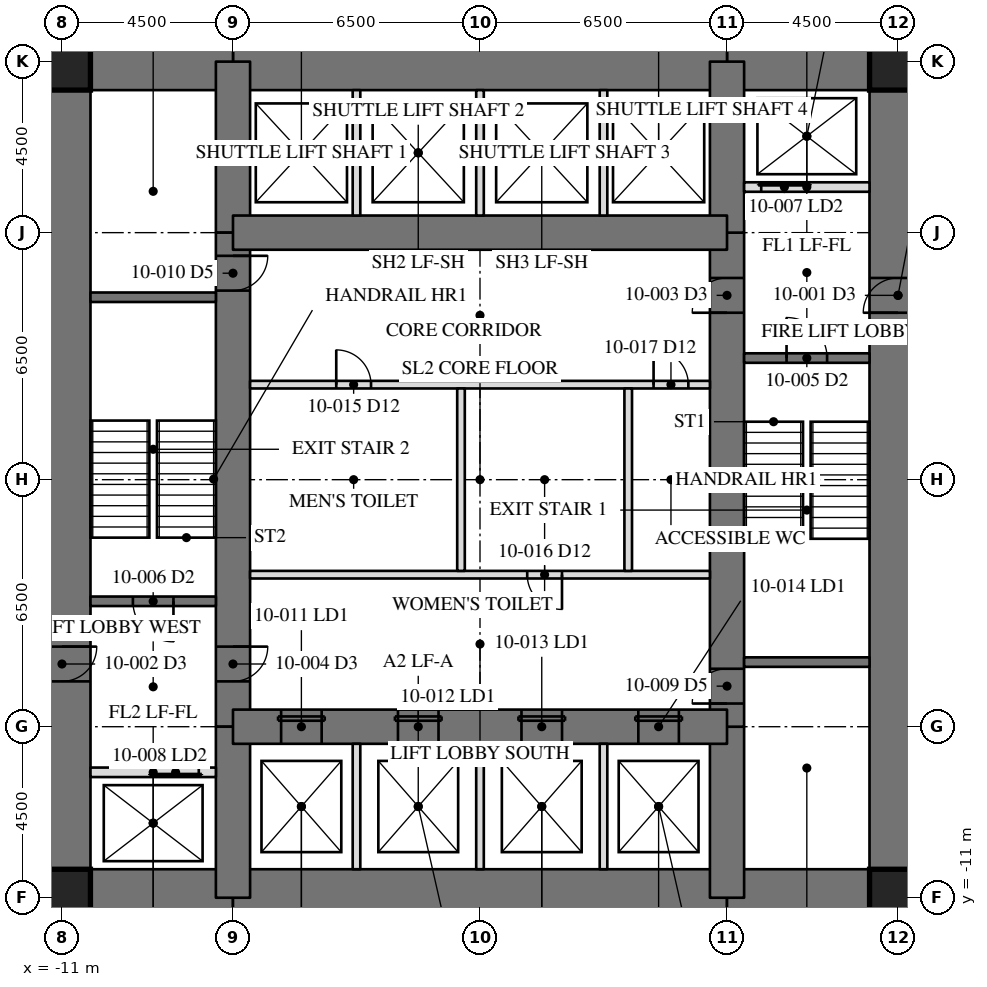
"""IFC4 building model, lengths in metres.
Left out: names, types, materials, properties, quantities, classifications, styles, units other than length and angle.
Written with IfcOpenShell. Run it as: python <this file> out.ifc"""

import sys

from ifc_helpers import new_model, si_unit, direction, frame, frame_2d, origin, origin_2d, place, context, subcontext, project, spatial, rectangle, hollow_rectangle, extrude, element, fill, save


model = new_model("IFC4")
c1 = context("Model", 3, precision=1e-05, world=origin(), true_north=direction((0.0, 1.0)))
c2 = subcontext(c1, "Body", "Model", "MODEL_VIEW")
j1 = project(units=[si_unit("LENGTHUNIT", "METRE"), si_unit("PLANEANGLEUNIT", "RADIAN")], contexts=[c1])
p1 = place(None, origin())
s1 = spatial("IfcSite", under=j1, at=p1, CompositionType="ELEMENT")
p2 = place(p1, origin())
s2 = spatial("IfcBuilding", under=s1, at=p2, CompositionType="ELEMENT")
p3 = place(p2, frame((0.0, 0.0, 44.7)))
s3 = spatial("IfcBuildingStorey", under=s2, at=p3, CompositionType="ELEMENT", Elevation=44.7)
p4 = place(p3, frame((11.0, -11.0, 0.0), z_axis=(0.0, 0.0, 1.0), x_axis=(0.0, 1.0, 0.0)))
e1 = element("IfcWall", 1, at=p4, inside=s3, PredefinedType="SHEAR", context=c2, shape_type="SweptSolid", body=[
    extrude(rectangle(XDim=22.0, YDim=1.5, at=frame_2d((11.0, 0.0))), origin(), (0.0, 0.0, 1.0), 4.1),
])
p5 = place(p4, frame((15.393, 0.0, 0.0)))
e2 = element("IfcOpeningElement", 2, at=p5, cuts=e1, PredefinedType="OPENING", context=c2, shape_type="SweptSolid", body=[
    extrude(rectangle(XDim=0.915, YDim=2.134, at=frame_2d((0.458, 1.067))), frame((0.0, 0.76, 0.0), z_axis=(0.0, -1.0, 0.0), x_axis=(1.0, 0.0, 0.0)), (0.0, 0.0, 1.0), 1.52),
])
p6 = place(p3, frame((-11.0, 11.0, 0.0), z_axis=(0.0, 0.0, 1.0), x_axis=(0.0, -1.0, 0.0)))
e3 = element("IfcWall", 3, at=p6, inside=s3, PredefinedType="SHEAR", context=c2, shape_type="SweptSolid", body=[
    extrude(rectangle(XDim=22.0, YDim=1.5, at=frame_2d((11.0, 0.0))), origin(), (0.0, 0.0, 1.0), 4.1),
])
p7 = place(p6, frame((15.393, 0.0, 0.0)))
e4 = element("IfcOpeningElement", 4, at=p7, cuts=e3, PredefinedType="OPENING", context=c2, shape_type="SweptSolid", body=[
    extrude(rectangle(XDim=0.915, YDim=2.134, at=frame_2d((0.458, 1.067))), frame((0.0, 0.76, 0.0), z_axis=(0.0, -1.0, 0.0), x_axis=(1.0, 0.0, 0.0)), (0.0, 0.0, 1.0), 1.52),
])
p8 = place(p3, frame((11.0, 11.0, 0.0), z_axis=(0.0, 0.0, 1.0), x_axis=(-1.0, 0.0, 0.0)))
e5 = element("IfcWall", 5, at=p8, inside=s3, PredefinedType="SHEAR", context=c2, shape_type="SweptSolid", body=[
    extrude(rectangle(XDim=4.5, YDim=1.5, at=frame_2d((2.25, 0.0))), origin(), (0.0, 0.0, 1.0), 4.1),
])
p9 = place(p3, frame((6.5, 11.0, 0.0), z_axis=(0.0, 0.0, 1.0), x_axis=(-1.0, 0.0, 0.0)))
e6 = element("IfcWall", 6, at=p9, inside=s3, PredefinedType="SHEAR", context=c2, shape_type="SweptSolid", body=[
    extrude(rectangle(XDim=13.0, YDim=1.5, at=frame_2d((6.5, 0.0))), origin(), (0.0, 0.0, 1.0), 4.1),
])
for number, where, z_axis, x_axis in (
    (7, (-6.5, 11.0, 0.0), (0.0, 0.0, 1.0), (-1.0, 0.0, 0.0)),
    (8, (-11.0, -11.0, 0.0), (0.0, 0.0, 1.0), (1.0, 0.0, 0.0)),
):
    element("IfcWall", number, at=place(p3, frame(where, z_axis=z_axis, x_axis=x_axis)), inside=s3, PredefinedType="SHEAR", context=c2, shape_type="SweptSolid", body=[
        extrude(rectangle(XDim=4.5, YDim=1.5, at=frame_2d((2.25, 0.0))), origin(), (0.0, 0.0, 1.0), 4.1),
    ])
p10 = place(p3, frame((-6.5, -11.0, 0.0), z_axis=(0.0, 0.0, 1.0), x_axis=(1.0, 0.0, 0.0)))
e9 = element("IfcWall", 9, at=p10, inside=s3, PredefinedType="SHEAR", context=c2, shape_type="SweptSolid", body=[
    extrude(rectangle(XDim=13.0, YDim=1.5, at=frame_2d((6.5, 0.0))), origin(), (0.0, 0.0, 1.0), 4.1),
])
p11 = place(p3, frame((6.5, -11.0, 0.0), z_axis=(0.0, 0.0, 1.0), x_axis=(1.0, 0.0, 0.0)))
e10 = element("IfcWall", 10, at=p11, inside=s3, PredefinedType="SHEAR", context=c2, shape_type="SweptSolid", body=[
    extrude(rectangle(XDim=4.5, YDim=1.5, at=frame_2d((2.25, 0.0))), origin(), (0.0, 0.0, 1.0), 4.1),
])
p12 = place(p3, frame((6.5, -11.0, 0.0), z_axis=(0.0, 0.0, 1.0), x_axis=(0.0, 1.0, 0.0)))
e11 = element("IfcWall", 11, at=p12, inside=s3, PredefinedType="SHEAR", context=c2, shape_type="SweptSolid", body=[
    extrude(rectangle(XDim=4.5, YDim=0.9, at=frame_2d((2.25, 0.0))), origin(), (0.0, 0.0, 1.0), 4.1),
])
p13 = place(p3, frame((6.5, -6.5, 0.0), z_axis=(0.0, 0.0, 1.0), x_axis=(0.0, 1.0, 0.0)))
e12 = element("IfcWall", 12, at=p13, inside=s3, PredefinedType="SHEAR", context=c2, shape_type="SweptSolid", body=[
    extrude(rectangle(XDim=13.0, YDim=0.9, at=frame_2d((6.5, 0.0))), origin(), (0.0, 0.0, 1.0), 4.1),
])
p14 = place(p13, frame((10.893, 0.0, 0.0)))
e13 = element("IfcOpeningElement", 13, at=p14, cuts=e12, PredefinedType="OPENING", context=c2, shape_type="SweptSolid", body=[
    extrude(rectangle(XDim=0.915, YDim=2.134, at=frame_2d((0.458, 1.067))), frame((0.0, 0.46, 0.0), z_axis=(0.0, -1.0, 0.0), x_axis=(1.0, 0.0, 0.0)), (0.0, 0.0, 1.0), 0.92),
])
p15 = place(p13, frame((0.61, 0.0, 0.0)))
e14 = element("IfcOpeningElement", 14, at=p15, cuts=e12, PredefinedType="OPENING", context=c2, shape_type="SweptSolid", body=[
    extrude(rectangle(XDim=0.915, YDim=2.134, at=frame_2d((0.458, 1.067))), frame((0.0, 0.46, 0.0), z_axis=(0.0, -1.0, 0.0), x_axis=(1.0, 0.0, 0.0)), (0.0, 0.0, 1.0), 0.92),
])
for number, where, z_axis, x_axis in (
    (15, (6.5, 6.5, 0.0), (0.0, 0.0, 1.0), (0.0, 1.0, 0.0)),
    (16, (-6.5, 11.0, 0.0), (0.0, 0.0, 1.0), (0.0, -1.0, 0.0)),
):
    element("IfcWall", number, at=place(p3, frame(where, z_axis=z_axis, x_axis=x_axis)), inside=s3, PredefinedType="SHEAR", context=c2, shape_type="SweptSolid", body=[
        extrude(rectangle(XDim=4.5, YDim=0.9, at=frame_2d((2.25, 0.0))), origin(), (0.0, 0.0, 1.0), 4.1),
    ])
p16 = place(p3, frame((-6.5, 6.5, 0.0), z_axis=(0.0, 0.0, 1.0), x_axis=(0.0, -1.0, 0.0)))
e17 = element("IfcWall", 17, at=p16, inside=s3, PredefinedType="SHEAR", context=c2, shape_type="SweptSolid", body=[
    extrude(rectangle(XDim=13.0, YDim=0.9, at=frame_2d((6.5, 0.0))), origin(), (0.0, 0.0, 1.0), 4.1),
])
p17 = place(p16, frame((10.893, 0.0, 0.0)))
e18 = element("IfcOpeningElement", 18, at=p17, cuts=e17, PredefinedType="OPENING", context=c2, shape_type="SweptSolid", body=[
    extrude(rectangle(XDim=0.915, YDim=2.134, at=frame_2d((0.458, 1.067))), frame((0.0, 0.46, 0.0), z_axis=(0.0, -1.0, 0.0), x_axis=(1.0, 0.0, 0.0)), (0.0, 0.0, 1.0), 0.92),
])
p18 = place(p16, frame((0.61, 0.0, 0.0)))
e19 = element("IfcOpeningElement", 19, at=p18, cuts=e17, PredefinedType="OPENING", context=c2, shape_type="SweptSolid", body=[
    extrude(rectangle(XDim=0.915, YDim=2.134, at=frame_2d((0.458, 1.067))), frame((0.0, 0.46, 0.0), z_axis=(0.0, -1.0, 0.0), x_axis=(1.0, 0.0, 0.0)), (0.0, 0.0, 1.0), 0.92),
])
p19 = place(p3, frame((-6.5, -6.5, 0.0), z_axis=(0.0, 0.0, 1.0), x_axis=(0.0, -1.0, 0.0)))
e20 = element("IfcWall", 20, at=p19, inside=s3, PredefinedType="SHEAR", context=c2, shape_type="SweptSolid", body=[
    extrude(rectangle(XDim=4.5, YDim=0.9, at=frame_2d((2.25, 0.0))), origin(), (0.0, 0.0, 1.0), 4.1),
])
p20 = place(p3, frame((6.5, 6.5, 0.0), z_axis=(0.0, 0.0, 1.0), x_axis=(-1.0, 0.0, 0.0)))
e21 = element("IfcWall", 21, at=p20, inside=s3, PredefinedType="SHEAR", context=c2, shape_type="SweptSolid", body=[
    extrude(rectangle(XDim=13.0, YDim=0.9, at=frame_2d((6.5, 0.0))), origin(), (0.0, 0.0, 1.0), 4.1),
])
p21 = place(p3, frame((-6.5, -6.5, 0.0), z_axis=(0.0, 0.0, 1.0), x_axis=(1.0, 0.0, 0.0)))
e22 = element("IfcWall", 22, at=p21, inside=s3, PredefinedType="SHEAR", context=c2, shape_type="SweptSolid", body=[
    extrude(rectangle(XDim=13.0, YDim=0.9, at=frame_2d((6.5, 0.0))), origin(), (0.0, 0.0, 1.0), 4.1),
])
p22 = place(p21, frame((1.267, 0.0, 0.0)))
e23 = element("IfcOpeningElement", 23, at=p22, cuts=e22, PredefinedType="OPENING", context=c2, shape_type="SweptSolid", body=[
    extrude(rectangle(XDim=1.067, YDim=2.134, at=frame_2d((0.533, 1.067))), frame((0.0, 0.46, 0.0), z_axis=(0.0, -1.0, 0.0), x_axis=(1.0, 0.0, 0.0)), (0.0, 0.0, 1.0), 0.92),
])
p23 = place(p21, frame((4.342, 0.0, 0.0)))
e24 = element("IfcOpeningElement", 24, at=p23, cuts=e22, PredefinedType="OPENING", context=c2, shape_type="SweptSolid", body=[
    extrude(rectangle(XDim=1.067, YDim=2.134, at=frame_2d((0.533, 1.067))), frame((0.0, 0.46, 0.0), z_axis=(0.0, -1.0, 0.0), x_axis=(1.0, 0.0, 0.0)), (0.0, 0.0, 1.0), 0.92),
])
p24 = place(p21, frame((7.592, 0.0, 0.0)))
e25 = element("IfcOpeningElement", 25, at=p24, cuts=e22, PredefinedType="OPENING", context=c2, shape_type="SweptSolid", body=[
    extrude(rectangle(XDim=1.067, YDim=2.134, at=frame_2d((0.533, 1.067))), frame((0.0, 0.46, 0.0), z_axis=(0.0, -1.0, 0.0), x_axis=(1.0, 0.0, 0.0)), (0.0, 0.0, 1.0), 0.92),
])
p25 = place(p21, frame((10.667, 0.0, 0.0)))
e26 = element("IfcOpeningElement", 26, at=p25, cuts=e22, PredefinedType="OPENING", context=c2, shape_type="SweptSolid", body=[
    extrude(rectangle(XDim=1.067, YDim=2.134, at=frame_2d((0.533, 1.067))), frame((0.0, 0.46, 0.0), z_axis=(0.0, -1.0, 0.0), x_axis=(1.0, 0.0, 0.0)), (0.0, 0.0, 1.0), 0.92),
])
for number, where, z_axis, x_axis in (
    (27, (11.0, 11.0, 0.0), (0.0, 0.0, 1.0), (1.0, 0.0, 0.0)),
    (28, (-11.0, 11.0, 0.0), (0.0, 0.0, 1.0), (1.0, 0.0, 0.0)),
    (29, (-11.0, -11.0, 0.0), (0.0, 0.0, 1.0), (1.0, 0.0, 0.0)),
    (30, (11.0, -11.0, 0.0), (0.0, 0.0, 1.0), (1.0, 0.0, 0.0)),
):
    element("IfcColumn", number, at=place(p3, frame(where, z_axis=z_axis, x_axis=x_axis)), inside=s3, PredefinedType="COLUMN", context=c2, shape_type="SweptSolid", body=[
        extrude(hollow_rectangle(XDim=1.499, YDim=1.499, WallThickness=0.102, at=origin_2d()), origin(), (0.0, 0.0, 1.0), 4.1),
    ])
for number, where, z_axis, x_axis in (
    (31, (6.95, -4.8, 0.0), (0.0, 0.0, 1.0), (1.0, 0.0, 0.0)),
    (32, (-6.95, 4.8, 0.0), (0.0, 0.0, 1.0), (-1.0, 0.0, 0.0)),
):
    element("IfcWall", number, at=place(p3, frame(where, z_axis=z_axis, x_axis=x_axis)), inside=s3, PredefinedType="SOLIDWALL", context=c2, shape_type="SweptSolid", body=[
        extrude(rectangle(XDim=3.3, YDim=0.25, at=frame_2d((1.65, 0.0))), origin(), (0.0, 0.0, 1.0), 3.91),
    ])
p26 = place(p3, frame((6.95, 3.2, 0.0), z_axis=(0.0, 0.0, 1.0), x_axis=(1.0, 0.0, 0.0)))
e33 = element("IfcWall", 33, at=p26, inside=s3, PredefinedType="SOLIDWALL", context=c2, shape_type="SweptSolid", body=[
    extrude(rectangle(XDim=3.3, YDim=0.25, at=frame_2d((1.65, 0.0))), origin(), (0.0, 0.0, 1.0), 3.91),
])
p27 = place(p26, frame((1.116, 0.0, 0.0)))
e34 = element("IfcOpeningElement", 34, at=p27, cuts=e33, PredefinedType="OPENING", context=c2, shape_type="SweptSolid", body=[
    extrude(rectangle(XDim=1.067, YDim=2.134, at=frame_2d((0.533, 1.067))), frame((0.0, 0.135, 0.0), z_axis=(0.0, -1.0, 0.0), x_axis=(1.0, 0.0, 0.0)), (0.0, 0.0, 1.0), 0.27),
])
p28 = place(p3, frame((-6.95, -3.2, 0.0), z_axis=(0.0, 0.0, 1.0), x_axis=(-1.0, 0.0, 0.0)))
e35 = element("IfcWall", 35, at=p28, inside=s3, PredefinedType="SOLIDWALL", context=c2, shape_type="SweptSolid", body=[
    extrude(rectangle(XDim=3.3, YDim=0.25, at=frame_2d((1.65, 0.0))), origin(), (0.0, 0.0, 1.0), 3.91),
])
p29 = place(p28, frame((1.116, 0.0, 0.0)))
e36 = element("IfcOpeningElement", 36, at=p29, cuts=e35, PredefinedType="OPENING", context=c2, shape_type="SweptSolid", body=[
    extrude(rectangle(XDim=1.067, YDim=2.134, at=frame_2d((0.533, 1.067))), frame((0.0, 0.135, 0.0), z_axis=(0.0, -1.0, 0.0), x_axis=(1.0, 0.0, 0.0)), (0.0, 0.0, 1.0), 0.27),
])
p30 = place(p3, frame((6.95, 7.7, 0.0), z_axis=(0.0, 0.0, 1.0), x_axis=(1.0, 0.0, 0.0)))
e37 = element("IfcWall", 37, at=p30, inside=s3, PredefinedType="PARTITIONING", context=c2, shape_type="SweptSolid", body=[
    extrude(rectangle(XDim=3.3, YDim=0.25, at=frame_2d((1.65, 0.0))), origin(), (0.0, 0.0, 1.0), 3.91),
])
p31 = place(p30, frame((0.45, 0.0, 0.0)))
e38 = element("IfcOpeningElement", 38, at=p31, cuts=e37, PredefinedType="OPENING", context=c2, shape_type="SweptSolid", body=[
    extrude(rectangle(XDim=1.219, YDim=2.134, at=frame_2d((0.609, 1.067))), frame((0.0, 0.135, 0.0), z_axis=(0.0, -1.0, 0.0), x_axis=(1.0, 0.0, 0.0)), (0.0, 0.0, 1.0), 0.27),
])
p32 = place(p3, frame((-6.95, -7.7, 0.0), z_axis=(0.0, 0.0, 1.0), x_axis=(-1.0, 0.0, 0.0)))
e39 = element("IfcWall", 39, at=p32, inside=s3, PredefinedType="PARTITIONING", context=c2, shape_type="SweptSolid", body=[
    extrude(rectangle(XDim=3.3, YDim=0.25, at=frame_2d((1.65, 0.0))), origin(), (0.0, 0.0, 1.0), 3.91),
])
p33 = place(p32, frame((0.45, 0.0, 0.0)))
e40 = element("IfcOpeningElement", 40, at=p33, cuts=e39, PredefinedType="OPENING", context=c2, shape_type="SweptSolid", body=[
    extrude(rectangle(XDim=1.219, YDim=2.134, at=frame_2d((0.609, 1.067))), frame((0.0, 0.135, 0.0), z_axis=(0.0, -1.0, 0.0), x_axis=(1.0, 0.0, 0.0)), (0.0, 0.0, 1.0), 0.27),
])
p34 = place(p3, frame((-6.05, 2.5, 0.0), z_axis=(0.0, 0.0, 1.0), x_axis=(1.0, 0.0, 0.0)))
e41 = element("IfcWall", 41, at=p34, inside=s3, PredefinedType="PARTITIONING", context=c2, shape_type="SweptSolid", body=[
    extrude(rectangle(XDim=12.1, YDim=0.2, at=frame_2d((6.05, 0.0))), origin(), (0.0, 0.0, 1.0), 3.91),
])
p35 = place(p34, frame((2.268, 0.0, 0.0)))
e42 = element("IfcOpeningElement", 42, at=p35, cuts=e41, PredefinedType="OPENING", context=c2, shape_type="SweptSolid", body=[
    extrude(rectangle(XDim=0.915, YDim=2.134, at=frame_2d((0.458, 1.067))), frame((0.0, 0.11, 0.0), z_axis=(0.0, -1.0, 0.0), x_axis=(1.0, 0.0, 0.0)), (0.0, 0.0, 1.0), 0.22),
])
p36 = place(p34, frame((10.617, 0.0, 0.0)))
e43 = element("IfcOpeningElement", 43, at=p36, cuts=e41, PredefinedType="OPENING", context=c2, shape_type="SweptSolid", body=[
    extrude(rectangle(XDim=0.915, YDim=2.134, at=frame_2d((0.458, 1.067))), frame((0.0, 0.11, 0.0), z_axis=(0.0, -1.0, 0.0), x_axis=(1.0, 0.0, 0.0)), (0.0, 0.0, 1.0), 0.22),
])
p37 = place(p3, frame((6.05, -2.5, 0.0), z_axis=(0.0, 0.0, 1.0), x_axis=(-1.0, 0.0, 0.0)))
e44 = element("IfcWall", 44, at=p37, inside=s3, PredefinedType="PARTITIONING", context=c2, shape_type="SweptSolid", body=[
    extrude(rectangle(XDim=12.1, YDim=0.2, at=frame_2d((6.05, 0.0))), origin(), (0.0, 0.0, 1.0), 3.91),
])
p38 = place(p37, frame((3.893, 0.0, 0.0)))
e45 = element("IfcOpeningElement", 45, at=p38, cuts=e44, PredefinedType="OPENING", context=c2, shape_type="SweptSolid", body=[
    extrude(rectangle(XDim=0.915, YDim=2.134, at=frame_2d((0.458, 1.067))), frame((0.0, 0.11, 0.0), z_axis=(0.0, -1.0, 0.0), x_axis=(1.0, 0.0, 0.0)), (0.0, 0.0, 1.0), 0.22),
])
for number, where, z_axis, x_axis in (
    (46, (-3.25, 6.95, 0.0), (0.0, 0.0, 1.0), (0.0, 1.0, 0.0)),
    (47, (0.0, 6.95, 0.0), (0.0, 0.0, 1.0), (0.0, 1.0, 0.0)),
    (48, (3.25, 6.95, 0.0), (0.0, 0.0, 1.0), (0.0, 1.0, 0.0)),
    (49, (-3.25, -10.25, 0.0), (0.0, 0.0, 1.0), (0.0, 1.0, 0.0)),
    (50, (0.0, -10.25, 0.0), (0.0, 0.0, 1.0), (0.0, 1.0, 0.0)),
    (51, (3.25, -10.25, 0.0), (0.0, 0.0, 1.0), (0.0, 1.0, 0.0)),
):
    element("IfcWall", number, at=place(p3, frame(where, z_axis=z_axis, x_axis=x_axis)), inside=s3, PredefinedType="PARTITIONING", context=c2, shape_type="SweptSolid", body=[
        extrude(rectangle(XDim=3.3, YDim=0.2, at=frame_2d((1.65, 0.0))), origin(), (0.0, 0.0, 1.0), 3.91),
    ])
for number, where, z_axis, x_axis in (
    (52, (-0.5, -2.4, 0.0), (0.0, 0.0, 1.0), (0.0, 1.0, 0.0)),
    (53, (3.9, -2.4, 0.0), (0.0, 0.0, 1.0), (0.0, 1.0, 0.0)),
):
    element("IfcWall", number, at=place(p3, frame(where, z_axis=z_axis, x_axis=x_axis)), inside=s3, PredefinedType="PARTITIONING", context=c2, shape_type="SweptSolid", body=[
        extrude(rectangle(XDim=4.8, YDim=0.2, at=frame_2d((2.4, 0.0))), origin(), (0.0, 0.0, 1.0), 3.91),
    ])
p39 = place(p14, origin())
e54 = element("IfcDoor", 54, at=p39, inside=s3, OperationType="SINGLE_SWING_RIGHT", PredefinedType="DOOR", context=c2, shape_type="SweptSolid", body=[
    extrude(rectangle(XDim=0.915, YDim=2.134, at=frame_2d((0.458, 1.067))), frame((0.0, -0.375, 0.0), z_axis=(0.0, -1.0, 0.0), x_axis=(1.0, 0.0, 0.0)), (0.0, 0.0, 1.0), 0.05),
])
fill(e13, e54)
p40 = place(p17, origin())
e55 = element("IfcDoor", 55, at=p40, inside=s3, OperationType="SINGLE_SWING_RIGHT", PredefinedType="DOOR", context=c2, shape_type="SweptSolid", body=[
    extrude(rectangle(XDim=0.915, YDim=2.134, at=frame_2d((0.458, 1.067))), frame((0.0, -0.375, 0.0), z_axis=(0.0, -1.0, 0.0), x_axis=(1.0, 0.0, 0.0)), (0.0, 0.0, 1.0), 0.05),
])
fill(e18, e55)
p41 = place(p27, origin())
e56 = element("IfcDoor", 56, at=p41, inside=s3, OperationType="SINGLE_SWING_LEFT", PredefinedType="DOOR", context=c2, shape_type="SweptSolid", body=[
    extrude(rectangle(XDim=1.067, YDim=2.134, at=frame_2d((0.533, 1.067))), frame((0.0, 0.025, 0.0), z_axis=(0.0, -1.0, 0.0), x_axis=(1.0, 0.0, 0.0)), (0.0, 0.0, 1.0), 0.05),
])
fill(e34, e56)
p42 = place(p29, origin())
e57 = element("IfcDoor", 57, at=p42, inside=s3, OperationType="SINGLE_SWING_LEFT", PredefinedType="DOOR", context=c2, shape_type="SweptSolid", body=[
    extrude(rectangle(XDim=1.067, YDim=2.134, at=frame_2d((0.533, 1.067))), frame((0.0, 0.025, 0.0), z_axis=(0.0, -1.0, 0.0), x_axis=(1.0, 0.0, 0.0)), (0.0, 0.0, 1.0), 0.05),
])
fill(e36, e57)
p43 = place(p31, origin())
e58 = element("IfcDoor", 58, at=p43, inside=s3, OperationType="SLIDING_TO_LEFT", PredefinedType="DOOR", context=c2, shape_type="SweptSolid", body=[
    extrude(rectangle(XDim=1.219, YDim=2.134, at=frame_2d((0.609, 1.067))), frame((0.0, 0.025, 0.0), z_axis=(0.0, -1.0, 0.0), x_axis=(1.0, 0.0, 0.0)), (0.0, 0.0, 1.0), 0.05),
])
fill(e38, e58)
p44 = place(p33, origin())
e59 = element("IfcDoor", 59, at=p44, inside=s3, OperationType="SLIDING_TO_LEFT", PredefinedType="DOOR", context=c2, shape_type="SweptSolid", body=[
    extrude(rectangle(XDim=1.219, YDim=2.134, at=frame_2d((0.609, 1.067))), frame((0.0, 0.025, 0.0), z_axis=(0.0, -1.0, 0.0), x_axis=(1.0, 0.0, 0.0)), (0.0, 0.0, 1.0), 0.05),
])
fill(e40, e59)
p45 = place(p15, origin())
e60 = element("IfcDoor", 60, at=p45, inside=s3, OperationType="SINGLE_SWING_RIGHT", PredefinedType="DOOR", context=c2, shape_type="SweptSolid", body=[
    extrude(rectangle(XDim=0.915, YDim=2.134, at=frame_2d((0.458, 1.067))), frame((0.0, -0.375, 0.0), z_axis=(0.0, -1.0, 0.0), x_axis=(1.0, 0.0, 0.0)), (0.0, 0.0, 1.0), 0.05),
])
fill(e14, e60)
p46 = place(p18, origin())
e61 = element("IfcDoor", 61, at=p46, inside=s3, OperationType="SINGLE_SWING_RIGHT", PredefinedType="DOOR", context=c2, shape_type="SweptSolid", body=[
    extrude(rectangle(XDim=0.915, YDim=2.134, at=frame_2d((0.458, 1.067))), frame((0.0, -0.375, 0.0), z_axis=(0.0, -1.0, 0.0), x_axis=(1.0, 0.0, 0.0)), (0.0, 0.0, 1.0), 0.05),
])
fill(e19, e61)
p47 = place(p22, origin())
e62 = element("IfcDoor", 62, at=p47, inside=s3, OperationType="SLIDING_TO_LEFT", PredefinedType="DOOR", context=c2, shape_type="SweptSolid", body=[
    extrude(rectangle(XDim=1.067, YDim=2.134, at=frame_2d((0.533, 1.067))), frame((0.0, -0.375, 0.0), z_axis=(0.0, -1.0, 0.0), x_axis=(1.0, 0.0, 0.0)), (0.0, 0.0, 1.0), 0.05),
])
fill(e23, e62)
p48 = place(p23, origin())
e63 = element("IfcDoor", 63, at=p48, inside=s3, OperationType="SLIDING_TO_LEFT", PredefinedType="DOOR", context=c2, shape_type="SweptSolid", body=[
    extrude(rectangle(XDim=1.067, YDim=2.134, at=frame_2d((0.533, 1.067))), frame((0.0, -0.375, 0.0), z_axis=(0.0, -1.0, 0.0), x_axis=(1.0, 0.0, 0.0)), (0.0, 0.0, 1.0), 0.05),
])
fill(e24, e63)
p49 = place(p24, origin())
e64 = element("IfcDoor", 64, at=p49, inside=s3, OperationType="SLIDING_TO_LEFT", PredefinedType="DOOR", context=c2, shape_type="SweptSolid", body=[
    extrude(rectangle(XDim=1.067, YDim=2.134, at=frame_2d((0.533, 1.067))), frame((0.0, -0.375, 0.0), z_axis=(0.0, -1.0, 0.0), x_axis=(1.0, 0.0, 0.0)), (0.0, 0.0, 1.0), 0.05),
])
fill(e25, e64)
p50 = place(p25, origin())
e65 = element("IfcDoor", 65, at=p50, inside=s3, OperationType="SLIDING_TO_LEFT", PredefinedType="DOOR", context=c2, shape_type="SweptSolid", body=[
    extrude(rectangle(XDim=1.067, YDim=2.134, at=frame_2d((0.533, 1.067))), frame((0.0, -0.375, 0.0), z_axis=(0.0, -1.0, 0.0), x_axis=(1.0, 0.0, 0.0)), (0.0, 0.0, 1.0), 0.05),
])
fill(e26, e65)
p51 = place(p35, origin())
e66 = element("IfcDoor", 66, at=p51, inside=s3, OperationType="SINGLE_SWING_LEFT", PredefinedType="DOOR", context=c2, shape_type="SweptSolid", body=[
    extrude(rectangle(XDim=0.915, YDim=2.134, at=frame_2d((0.458, 1.067))), frame((0.0, 0.025, 0.0), z_axis=(0.0, -1.0, 0.0), x_axis=(1.0, 0.0, 0.0)), (0.0, 0.0, 1.0), 0.05),
])
fill(e42, e66)
p52 = place(p38, origin())
e67 = element("IfcDoor", 67, at=p52, inside=s3, OperationType="SINGLE_SWING_LEFT", PredefinedType="DOOR", context=c2, shape_type="SweptSolid", body=[
    extrude(rectangle(XDim=0.915, YDim=2.134, at=frame_2d((0.458, 1.067))), frame((0.0, 0.025, 0.0), z_axis=(0.0, -1.0, 0.0), x_axis=(1.0, 0.0, 0.0)), (0.0, 0.0, 1.0), 0.05),
])
fill(e45, e67)
p53 = place(p36, origin())
e68 = element("IfcDoor", 68, at=p53, inside=s3, OperationType="SINGLE_SWING_LEFT", PredefinedType="DOOR", context=c2, shape_type="SweptSolid", body=[
    extrude(rectangle(XDim=0.915, YDim=2.134, at=frame_2d((0.458, 1.067))), frame((0.0, 0.025, 0.0), z_axis=(0.0, -1.0, 0.0), x_axis=(1.0, 0.0, 0.0)), (0.0, 0.0, 1.0), 0.05),
])
fill(e43, e68)
save(model, sys.argv[1])
